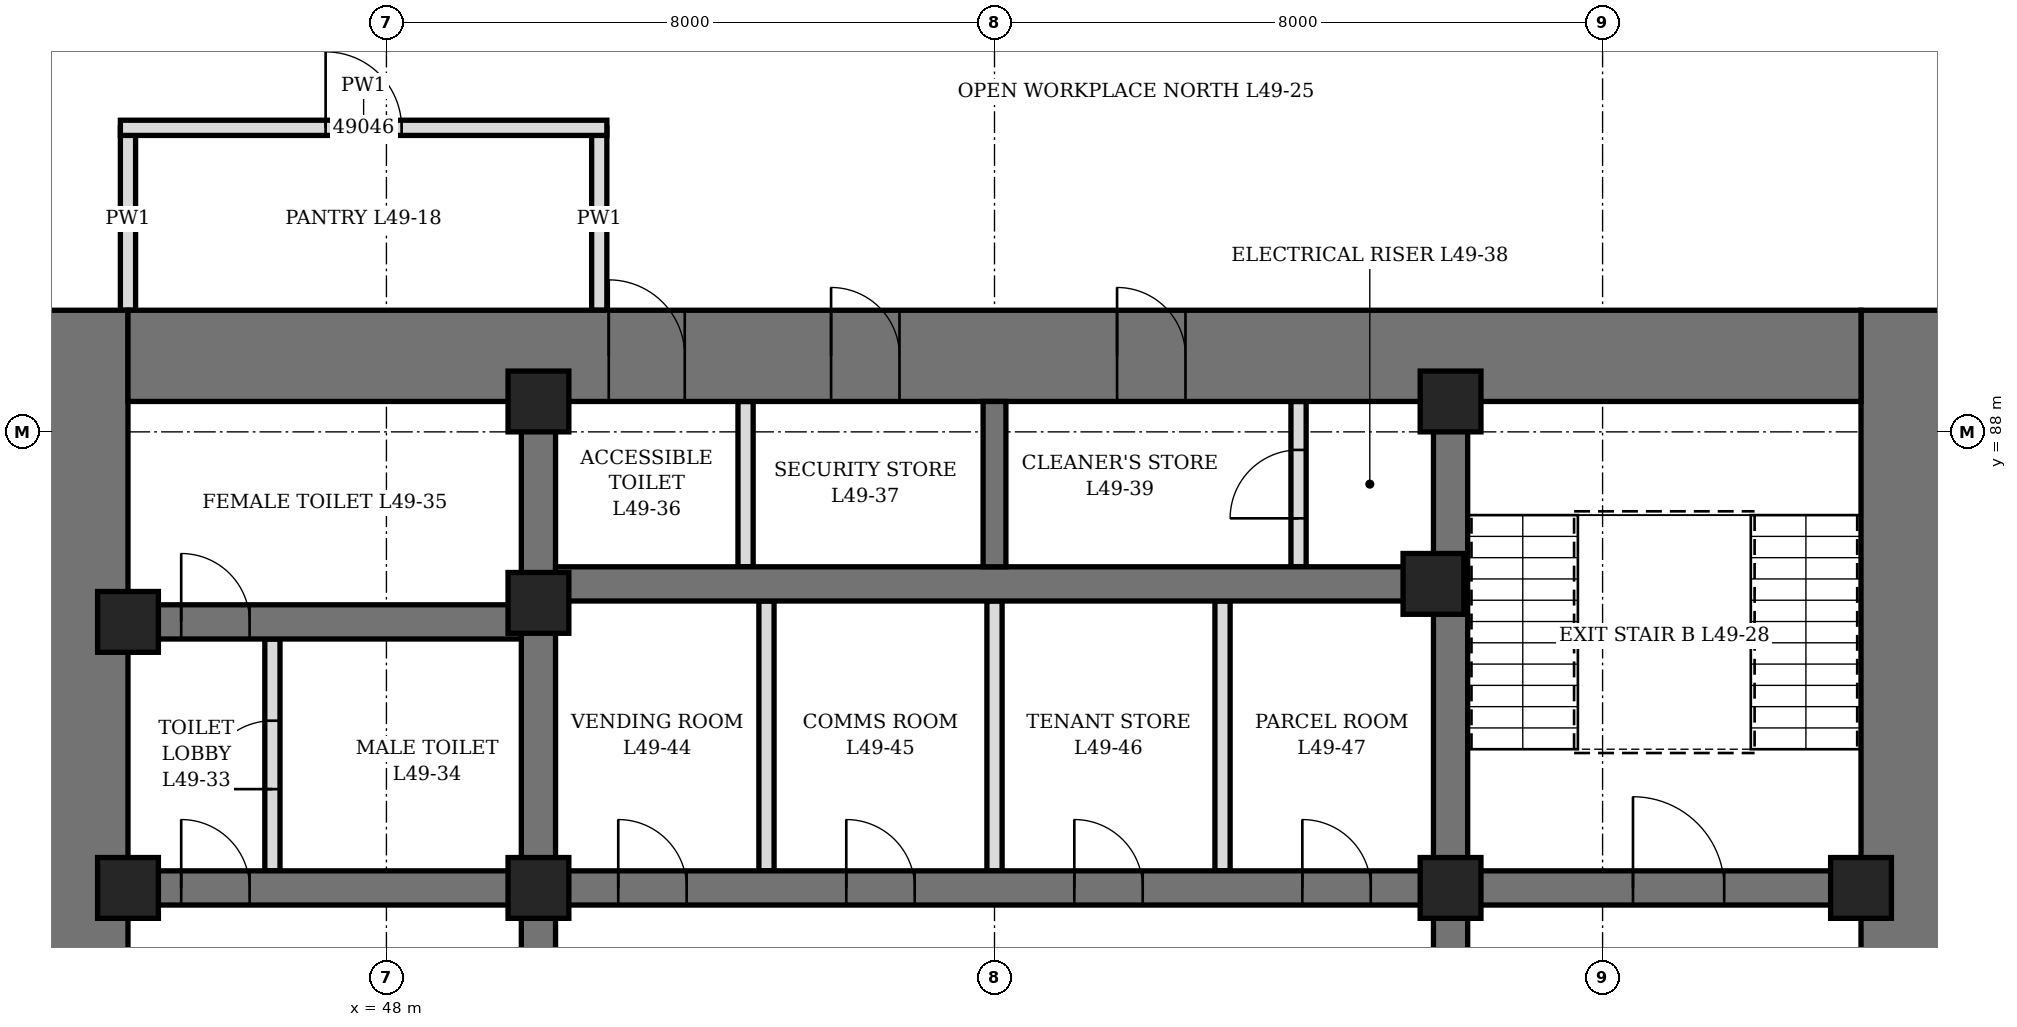
"""IFC4 building model, lengths in metres.
Left out: names, types, materials, properties, quantities, classifications, styles, units other than length and angle.
Written with IfcOpenShell. Run it as: python <this file> out.ifc"""

import sys

from ifc_helpers import new_model, si_unit, direction, frame, frame_2d, origin, origin_2d, place, context, subcontext, project, spatial, rectangle, hollow_rectangle, extrude, element, fill, save


model = new_model("IFC4")
c1 = context("Model", 3, precision=1e-05, world=origin(), true_north=direction((0.0, 1.0)))
c2 = subcontext(c1, "Body", "Model", "MODEL_VIEW")
j1 = project(units=[si_unit("LENGTHUNIT", "METRE"), si_unit("PLANEANGLEUNIT", "RADIAN")], contexts=[c1])
p1 = place(None, origin())
s1 = spatial("IfcSite", under=j1, at=p1, CompositionType="ELEMENT")
p2 = place(p1, origin())
s2 = spatial("IfcBuilding", under=s1, at=p2, CompositionType="ELEMENT")
p3 = place(p2, frame((0.0, 0.0, 219.1)))
s3 = spatial("IfcBuildingStorey", under=s2, at=p3, CompositionType="ELEMENT", Elevation=219.1)
p4 = place(p3, frame((44.0, 70.4, 0.0), z_axis=(0.0, 0.0, 1.0), x_axis=(0.0, 1.0, 0.0)))
e1 = element("IfcWall", 1, at=p4, inside=s3, PredefinedType="SHEAR", context=c2, shape_type="SweptSolid", body=[
    extrude(rectangle(XDim=19.2, YDim=1.2, at=frame_2d((9.6, 0.0))), origin(), (0.0, 0.0, 1.0), 4.2),
])
p5 = place(p4, frame((8.6, 0.0, 0.0)))
e2 = element("IfcOpeningElement", 2, at=p5, cuts=e1, PredefinedType="OPENING", context=c2, shape_type="SweptSolid", body=[
    extrude(rectangle(XDim=2.0, YDim=2.4, at=frame_2d((1.0, 1.2))), frame((0.0, 0.61, 0.0), z_axis=(0.0, -1.0, 0.0), x_axis=(1.0, 0.0, 0.0)), (0.0, 0.0, 1.0), 1.22),
])
p6 = place(p3, frame((68.0, 70.4, 0.0), z_axis=(0.0, 0.0, 1.0), x_axis=(0.0, 1.0, 0.0)))
e3 = element("IfcWall", 3, at=p6, inside=s3, PredefinedType="SHEAR", context=c2, shape_type="SweptSolid", body=[
    extrude(rectangle(XDim=19.2, YDim=1.2, at=frame_2d((9.6, 0.0))), origin(), (0.0, 0.0, 1.0), 4.2),
])
p7 = place(p6, frame((8.6, 0.0, 0.0)))
e4 = element("IfcOpeningElement", 4, at=p7, cuts=e3, PredefinedType="OPENING", context=c2, shape_type="SweptSolid", body=[
    extrude(rectangle(XDim=2.0, YDim=2.4, at=frame_2d((1.0, 1.2))), frame((0.0, 0.61, 0.0), z_axis=(0.0, -1.0, 0.0), x_axis=(1.0, 0.0, 0.0)), (0.0, 0.0, 1.0), 1.22),
])
p8 = place(p3, frame((44.6, 89.0, 0.0), z_axis=(0.0, 0.0, 1.0), x_axis=(1.0, 0.0, 0.0)))
e5 = element("IfcWall", 5, at=p8, inside=s3, PredefinedType="SHEAR", context=c2, shape_type="SweptSolid", body=[
    extrude(rectangle(XDim=22.8, YDim=1.2, at=frame_2d((11.4, 0.0))), origin(), (0.0, 0.0, 1.0), 4.2),
])
p9 = place(p8, frame((6.325, 0.0, 0.0)))
e6 = element("IfcOpeningElement", 6, at=p9, cuts=e5, PredefinedType="OPENING", context=c2, shape_type="SweptSolid", body=[
    extrude(rectangle(XDim=1.0, YDim=2.1, at=frame_2d((0.5, 1.05))), frame((0.0, 0.61, 0.0), z_axis=(0.0, -1.0, 0.0), x_axis=(1.0, 0.0, 0.0)), (0.0, 0.0, 1.0), 1.22),
])
p10 = place(p8, frame((9.25, 0.0, 0.0)))
e7 = element("IfcOpeningElement", 7, at=p10, cuts=e5, PredefinedType="OPENING", context=c2, shape_type="SweptSolid", body=[
    extrude(rectangle(XDim=0.9, YDim=2.1, at=frame_2d((0.45, 1.05))), frame((0.0, 0.61, 0.0), z_axis=(0.0, -1.0, 0.0), x_axis=(1.0, 0.0, 0.0)), (0.0, 0.0, 1.0), 1.22),
])
p11 = place(p8, frame((13.012, 0.0, 0.0)))
e8 = element("IfcOpeningElement", 8, at=p11, cuts=e5, PredefinedType="OPENING", context=c2, shape_type="SweptSolid", body=[
    extrude(rectangle(XDim=0.9, YDim=2.1, at=frame_2d((0.45, 1.05))), frame((0.0, 0.61, 0.0), z_axis=(0.0, -1.0, 0.0), x_axis=(1.0, 0.0, 0.0)), (0.0, 0.0, 1.0), 1.22),
])
p12 = place(p3, frame((50.0, 71.6, 0.0), z_axis=(0.0, 0.0, 1.0), x_axis=(0.0, 1.0, 0.0)))
e9 = element("IfcWall", 9, at=p12, inside=s3, PredefinedType="SHEAR", context=c2, shape_type="SweptSolid", body=[
    extrude(rectangle(XDim=16.8, YDim=0.45, at=frame_2d((8.4, 0.0))), origin(), (0.0, 0.0, 1.0), 4.2),
])
p13 = place(p12, frame((7.5, 0.0, 0.0)))
e10 = element("IfcOpeningElement", 10, at=p13, cuts=e9, PredefinedType="OPENING", context=c2, shape_type="SweptSolid", body=[
    extrude(rectangle(XDim=1.8, YDim=2.4, at=frame_2d((0.9, 1.2))), frame((0.0, 0.235, 0.0), z_axis=(0.0, -1.0, 0.0), x_axis=(1.0, 0.0, 0.0)), (0.0, 0.0, 1.0), 0.47),
])
p14 = place(p3, frame((62.0, 71.6, 0.0), z_axis=(0.0, 0.0, 1.0), x_axis=(0.0, 1.0, 0.0)))
e11 = element("IfcWall", 11, at=p14, inside=s3, PredefinedType="SHEAR", context=c2, shape_type="SweptSolid", body=[
    extrude(rectangle(XDim=16.8, YDim=0.45, at=frame_2d((8.4, 0.0))), origin(), (0.0, 0.0, 1.0), 4.2),
])
p15 = place(p14, frame((7.5, 0.0, 0.0)))
e12 = element("IfcOpeningElement", 12, at=p15, cuts=e11, PredefinedType="OPENING", context=c2, shape_type="SweptSolid", body=[
    extrude(rectangle(XDim=1.8, YDim=2.4, at=frame_2d((0.9, 1.2))), frame((0.0, 0.235, 0.0), z_axis=(0.0, -1.0, 0.0), x_axis=(1.0, 0.0, 0.0)), (0.0, 0.0, 1.0), 0.47),
])
p16 = place(p3, frame((44.6, 82.0, 0.0), z_axis=(0.0, 0.0, 1.0), x_axis=(1.0, 0.0, 0.0)))
e13 = element("IfcWall", 13, at=p16, inside=s3, PredefinedType="SHEAR", context=c2, shape_type="SweptSolid", body=[
    extrude(rectangle(XDim=5.175, YDim=0.45, at=frame_2d((2.587, 0.0))), origin(), (0.0, 0.0, 1.0), 4.2),
])
p17 = place(p16, frame((0.7, 0.0, 0.0)))
e14 = element("IfcOpeningElement", 14, at=p17, cuts=e13, PredefinedType="OPENING", context=c2, shape_type="SweptSolid", body=[
    extrude(rectangle(XDim=0.9, YDim=2.1, at=frame_2d((0.45, 1.05))), frame((0.0, 0.235, 0.0), z_axis=(0.0, -1.0, 0.0), x_axis=(1.0, 0.0, 0.0)), (0.0, 0.0, 1.0), 0.47),
])
p18 = place(p3, frame((44.6, 85.5, 0.0), z_axis=(0.0, 0.0, 1.0), x_axis=(1.0, 0.0, 0.0)))
e15 = element("IfcWall", 15, at=p18, inside=s3, PredefinedType="SHEAR", context=c2, shape_type="SweptSolid", body=[
    extrude(rectangle(XDim=5.175, YDim=0.45, at=frame_2d((2.587, 0.0))), origin(), (0.0, 0.0, 1.0), 4.2),
])
p19 = place(p18, frame((0.7, 0.0, 0.0)))
e16 = element("IfcOpeningElement", 16, at=p19, cuts=e15, PredefinedType="OPENING", context=c2, shape_type="SweptSolid", body=[
    extrude(rectangle(XDim=0.9, YDim=2.1, at=frame_2d((0.45, 1.05))), frame((0.0, 0.235, 0.0), z_axis=(0.0, -1.0, 0.0), x_axis=(1.0, 0.0, 0.0)), (0.0, 0.0, 1.0), 0.47),
])
p20 = place(p3, frame((62.225, 82.0, 0.0), z_axis=(0.0, 0.0, 1.0), x_axis=(1.0, 0.0, 0.0)))
e17 = element("IfcWall", 17, at=p20, inside=s3, PredefinedType="SHEAR", context=c2, shape_type="SweptSolid", body=[
    extrude(rectangle(XDim=5.175, YDim=0.45, at=frame_2d((2.587, 0.0))), origin(), (0.0, 0.0, 1.0), 4.2),
])
p21 = place(p20, frame((2.175, 0.0, 0.0)))
e18 = element("IfcOpeningElement", 18, at=p21, cuts=e17, PredefinedType="OPENING", context=c2, shape_type="SweptSolid", body=[
    extrude(rectangle(XDim=1.2, YDim=2.1, at=frame_2d((0.6, 1.05))), frame((0.0, 0.235, 0.0), z_axis=(0.0, -1.0, 0.0), x_axis=(1.0, 0.0, 0.0)), (0.0, 0.0, 1.0), 0.47),
])
p22 = place(p3, frame((50.225, 82.0, 0.0), z_axis=(0.0, 0.0, 1.0), x_axis=(1.0, 0.0, 0.0)))
e19 = element("IfcWall", 19, at=p22, inside=s3, PredefinedType="SHEAR", context=c2, shape_type="SweptSolid", body=[
    extrude(rectangle(XDim=11.55, YDim=0.45, at=frame_2d((5.775, 0.0))), origin(), (0.0, 0.0, 1.0), 4.2),
])
p23 = place(p22, frame((0.825, 0.0, 0.0)))
e20 = element("IfcOpeningElement", 20, at=p23, cuts=e19, PredefinedType="OPENING", context=c2, shape_type="SweptSolid", body=[
    extrude(rectangle(XDim=0.9, YDim=2.1, at=frame_2d((0.45, 1.05))), frame((0.0, 0.235, 0.0), z_axis=(0.0, -1.0, 0.0), x_axis=(1.0, 0.0, 0.0)), (0.0, 0.0, 1.0), 0.47),
])
p24 = place(p22, frame((3.825, 0.0, 0.0)))
e21 = element("IfcOpeningElement", 21, at=p24, cuts=e19, PredefinedType="OPENING", context=c2, shape_type="SweptSolid", body=[
    extrude(rectangle(XDim=0.9, YDim=2.1, at=frame_2d((0.45, 1.05))), frame((0.0, 0.235, 0.0), z_axis=(0.0, -1.0, 0.0), x_axis=(1.0, 0.0, 0.0)), (0.0, 0.0, 1.0), 0.47),
])
p25 = place(p22, frame((6.825, 0.0, 0.0)))
e22 = element("IfcOpeningElement", 22, at=p25, cuts=e19, PredefinedType="OPENING", context=c2, shape_type="SweptSolid", body=[
    extrude(rectangle(XDim=0.9, YDim=2.1, at=frame_2d((0.45, 1.05))), frame((0.0, 0.235, 0.0), z_axis=(0.0, -1.0, 0.0), x_axis=(1.0, 0.0, 0.0)), (0.0, 0.0, 1.0), 0.47),
])
p26 = place(p22, frame((9.825, 0.0, 0.0)))
e23 = element("IfcOpeningElement", 23, at=p26, cuts=e19, PredefinedType="OPENING", context=c2, shape_type="SweptSolid", body=[
    extrude(rectangle(XDim=0.9, YDim=2.1, at=frame_2d((0.45, 1.05))), frame((0.0, 0.235, 0.0), z_axis=(0.0, -1.0, 0.0), x_axis=(1.0, 0.0, 0.0)), (0.0, 0.0, 1.0), 0.47),
])
p27 = place(p3, frame((50.225, 86.0, 0.0), z_axis=(0.0, 0.0, 1.0), x_axis=(1.0, 0.0, 0.0)))
e24 = element("IfcWall", 24, at=p27, inside=s3, PredefinedType="SHEAR", context=c2, shape_type="SweptSolid", body=[
    extrude(rectangle(XDim=11.55, YDim=0.45, at=frame_2d((5.775, 0.0))), origin(), (0.0, 0.0, 1.0), 4.2),
])
p28 = place(p3, frame((56.0, 86.225, 0.0), z_axis=(0.0, 0.0, 1.0), x_axis=(0.0, 1.0, 0.0)))
e25 = element("IfcWall", 25, at=p28, inside=s3, PredefinedType="SHEAR", context=c2, shape_type="SweptSolid", body=[
    extrude(rectangle(XDim=2.175, YDim=0.3, at=frame_2d((1.087, 0.0))), origin(), (0.0, 0.0, 1.0), 4.2),
])
for number, where, z_axis, x_axis in (
    (26, (44.6, 82.0, 0.0), (0.0, 0.0, 1.0), (1.0, 0.0, 0.0)),
    (27, (44.6, 85.5, 0.0), (0.0, 0.0, 1.0), (1.0, 0.0, 0.0)),
    (28, (50.0, 82.0, 0.0), (0.0, 0.0, 1.0), (1.0, 0.0, 0.0)),
    (29, (50.0, 85.75, 0.0), (0.0, 0.0, 1.0), (1.0, 0.0, 0.0)),
    (30, (50.0, 88.4, 0.0), (0.0, 0.0, 1.0), (1.0, 0.0, 0.0)),
    (31, (61.775, 86.0, 0.0), (0.0, 0.0, 1.0), (1.0, 0.0, 0.0)),
    (32, (62.0, 82.0, 0.0), (0.0, 0.0, 1.0), (1.0, 0.0, 0.0)),
    (33, (62.0, 88.4, 0.0), (0.0, 0.0, 1.0), (1.0, 0.0, 0.0)),
    (34, (67.4, 82.0, 0.0), (0.0, 0.0, 1.0), (1.0, 0.0, 0.0)),
):
    element("IfcColumn", number, at=place(p3, frame(where, z_axis=z_axis, x_axis=x_axis)), inside=s3, PredefinedType="COLUMN", context=c2, shape_type="SweptSolid", body=[
        extrude(hollow_rectangle(XDim=0.8, YDim=0.8, WallThickness=0.1, at=origin_2d()), origin(), (0.0, 0.0, 1.0), 4.2),
    ])
p29 = place(p3, frame((46.5, 82.225, 0.0), z_axis=(0.0, 0.0, 1.0), x_axis=(0.0, 1.0, 0.0)))
e35 = element("IfcWall", 35, at=p29, inside=s3, PredefinedType="PARTITIONING", context=c2, shape_type="SweptSolid", body=[
    extrude(rectangle(XDim=3.05, YDim=0.2, at=frame_2d((1.525, 0.0))), origin(), (0.0, 0.0, 1.0), 4.04),
])
p30 = place(p29, frame((1.075, 0.0, 0.0)))
e36 = element("IfcOpeningElement", 36, at=p30, cuts=e35, PredefinedType="OPENING", context=c2, shape_type="SweptSolid", body=[
    extrude(rectangle(XDim=0.9, YDim=2.1, at=frame_2d((0.45, 1.05))), frame((0.0, 0.11, 0.0), z_axis=(0.0, -1.0, 0.0), x_axis=(1.0, 0.0, 0.0)), (0.0, 0.0, 1.0), 0.22),
])
p31 = place(p3, frame((52.725, 86.225, 0.0), z_axis=(0.0, 0.0, 1.0), x_axis=(0.0, 1.0, 0.0)))
e37 = element("IfcWall", 37, at=p31, inside=s3, PredefinedType="PARTITIONING", context=c2, shape_type="SweptSolid", body=[
    extrude(rectangle(XDim=2.175, YDim=0.2, at=frame_2d((1.087, 0.0))), origin(), (0.0, 0.0, 1.0), 4.04),
])
p32 = place(p3, frame((60.0, 86.225, 0.0), z_axis=(0.0, 0.0, 1.0), x_axis=(0.0, 1.0, 0.0)))
e38 = element("IfcWall", 38, at=p32, inside=s3, PredefinedType="PARTITIONING", context=c2, shape_type="SweptSolid", body=[
    extrude(rectangle(XDim=2.175, YDim=0.2, at=frame_2d((1.087, 0.0))), origin(), (0.0, 0.0, 1.0), 4.04),
])
p33 = place(p32, frame((0.637, 0.0, 0.0)))
e39 = element("IfcOpeningElement", 39, at=p33, cuts=e38, PredefinedType="OPENING", context=c2, shape_type="SweptSolid", body=[
    extrude(rectangle(XDim=0.9, YDim=2.1, at=frame_2d((0.45, 1.05))), frame((0.0, 0.11, 0.0), z_axis=(0.0, -1.0, 0.0), x_axis=(1.0, 0.0, 0.0)), (0.0, 0.0, 1.0), 0.22),
])
p34 = place(p3, frame((53.0, 82.225, 0.0), z_axis=(0.0, 0.0, 1.0), x_axis=(0.0, 1.0, 0.0)))
e40 = element("IfcWall", 40, at=p34, inside=s3, PredefinedType="PARTITIONING", context=c2, shape_type="SweptSolid", body=[
    extrude(rectangle(XDim=3.55, YDim=0.2, at=frame_2d((1.775, 0.0))), origin(), (0.0, 0.0, 1.0), 4.04),
])
p35 = place(p3, frame((56.0, 82.225, 0.0), z_axis=(0.0, 0.0, 1.0), x_axis=(0.0, 1.0, 0.0)))
e41 = element("IfcWall", 41, at=p35, inside=s3, PredefinedType="PARTITIONING", context=c2, shape_type="SweptSolid", body=[
    extrude(rectangle(XDim=3.55, YDim=0.2, at=frame_2d((1.775, 0.0))), origin(), (0.0, 0.0, 1.0), 3.14),
])
p36 = place(p3, frame((59.0, 82.225, 0.0), z_axis=(0.0, 0.0, 1.0), x_axis=(0.0, 1.0, 0.0)))
e42 = element("IfcWall", 42, at=p36, inside=s3, PredefinedType="PARTITIONING", context=c2, shape_type="SweptSolid", body=[
    extrude(rectangle(XDim=3.55, YDim=0.2, at=frame_2d((1.775, 0.0))), origin(), (0.0, 0.0, 1.0), 4.04),
])
for number, where, z_axis, x_axis in (
    (43, (44.6, 89.6, 0.0), (0.0, 0.0, 1.0), (0.0, 1.0, 0.0)),
    (44, (50.8, 89.6, 0.0), (0.0, 0.0, 1.0), (0.0, 1.0, 0.0)),
):
    element("IfcWall", number, at=place(p3, frame(where, z_axis=z_axis, x_axis=x_axis)), inside=s3, PredefinedType="PARTITIONING", context=c2, shape_type="SweptSolid", body=[
        extrude(rectangle(XDim=2.4, YDim=0.2, at=frame_2d((1.2, 0.0))), origin(), (0.0, 0.0, 1.0), 4.04),
    ])
p37 = place(p3, frame((44.5, 92.0, 0.0), z_axis=(0.0, 0.0, 1.0), x_axis=(1.0, 0.0, 0.0)))
e45 = element("IfcWall", 45, at=p37, inside=s3, PredefinedType="PARTITIONING", context=c2, shape_type="SweptSolid", body=[
    extrude(rectangle(XDim=6.4, YDim=0.2, at=frame_2d((3.2, 0.0))), origin(), (0.0, 0.0, 1.0), 4.04),
])
p38 = place(p37, frame((2.7, 0.0, 0.0)))
e46 = element("IfcOpeningElement", 46, at=p38, cuts=e45, PredefinedType="OPENING", context=c2, shape_type="SweptSolid", body=[
    extrude(rectangle(XDim=1.0, YDim=2.1, at=frame_2d((0.5, 1.05))), frame((0.0, 0.11, 0.0), z_axis=(0.0, -1.0, 0.0), x_axis=(1.0, 0.0, 0.0)), (0.0, 0.0, 1.0), 0.22),
])
p39 = place(p17, origin())
e47 = element("IfcDoor", 47, at=p39, inside=s3, OperationType="SINGLE_SWING_LEFT", PredefinedType="DOOR", context=c2, shape_type="SweptSolid", body=[
    extrude(rectangle(XDim=0.9, YDim=2.1, at=frame_2d((0.45, 1.05))), frame((0.0, 0.225, 0.0), z_axis=(0.0, -1.0, 0.0), x_axis=(1.0, 0.0, 0.0)), (0.0, 0.0, 1.0), 0.449),
])
fill(e14, e47)
p40 = place(p30, origin())
e48 = element("IfcDoor", 48, at=p40, inside=s3, OperationType="SINGLE_SWING_RIGHT", PredefinedType="DOOR", context=c2, shape_type="SweptSolid", body=[
    extrude(rectangle(XDim=0.9, YDim=2.1, at=frame_2d((0.45, 1.05))), frame((0.0, 0.1, 0.0), z_axis=(0.0, -1.0, 0.0), x_axis=(1.0, 0.0, 0.0)), (0.0, 0.0, 1.0), 0.199),
])
fill(e36, e48)
p41 = place(p19, origin())
e49 = element("IfcDoor", 49, at=p41, inside=s3, OperationType="SINGLE_SWING_RIGHT", PredefinedType="DOOR", context=c2, shape_type="SweptSolid", body=[
    extrude(rectangle(XDim=0.9, YDim=2.1, at=frame_2d((0.45, 1.05))), frame((0.0, 0.225, 0.0), z_axis=(0.0, -1.0, 0.0), x_axis=(1.0, 0.0, 0.0)), (0.0, 0.0, 1.0), 0.449),
])
fill(e16, e49)
p42 = place(p9, origin())
e50 = element("IfcDoor", 50, at=p42, inside=s3, OperationType="SINGLE_SWING_LEFT", PredefinedType="DOOR", context=c2, shape_type="SweptSolid", body=[
    extrude(rectangle(XDim=1.0, YDim=2.1, at=frame_2d((0.5, 1.05))), frame((0.0, 0.35, 0.0), z_axis=(0.0, -1.0, 0.0), x_axis=(1.0, 0.0, 0.0)), (0.0, 0.0, 1.0), 0.7),
])
fill(e6, e50)
p43 = place(p10, origin())
e51 = element("IfcDoor", 51, at=p43, inside=s3, OperationType="SINGLE_SWING_LEFT", PredefinedType="DOOR", context=c2, shape_type="SweptSolid", body=[
    extrude(rectangle(XDim=0.9, YDim=2.1, at=frame_2d((0.45, 1.05))), frame((0.0, 0.35, 0.0), z_axis=(0.0, -1.0, 0.0), x_axis=(1.0, 0.0, 0.0)), (0.0, 0.0, 1.0), 0.7),
])
fill(e7, e51)
p44 = place(p11, origin())
e52 = element("IfcDoor", 52, at=p44, inside=s3, OperationType="SINGLE_SWING_LEFT", PredefinedType="DOOR", context=c2, shape_type="SweptSolid", body=[
    extrude(rectangle(XDim=0.9, YDim=2.1, at=frame_2d((0.45, 1.05))), frame((0.0, 0.35, 0.0), z_axis=(0.0, -1.0, 0.0), x_axis=(1.0, 0.0, 0.0)), (0.0, 0.0, 1.0), 0.7),
])
fill(e8, e52)
p45 = place(p33, origin())
e53 = element("IfcDoor", 53, at=p45, inside=s3, OperationType="SINGLE_SWING_LEFT", PredefinedType="DOOR", context=c2, shape_type="SweptSolid", body=[
    extrude(rectangle(XDim=0.9, YDim=2.1, at=frame_2d((0.45, 1.05))), frame((0.0, 0.1, 0.0), z_axis=(0.0, -1.0, 0.0), x_axis=(1.0, 0.0, 0.0)), (0.0, 0.0, 1.0), 0.199),
])
fill(e39, e53)
p46 = place(p23, origin())
e54 = element("IfcDoor", 54, at=p46, inside=s3, OperationType="SINGLE_SWING_LEFT", PredefinedType="DOOR", context=c2, shape_type="SweptSolid", body=[
    extrude(rectangle(XDim=0.9, YDim=2.1, at=frame_2d((0.45, 1.05))), frame((0.0, 0.225, 0.0), z_axis=(0.0, -1.0, 0.0), x_axis=(1.0, 0.0, 0.0)), (0.0, 0.0, 1.0), 0.449),
])
fill(e20, e54)
p47 = place(p24, origin())
e55 = element("IfcDoor", 55, at=p47, inside=s3, OperationType="SINGLE_SWING_LEFT", PredefinedType="DOOR", context=c2, shape_type="SweptSolid", body=[
    extrude(rectangle(XDim=0.9, YDim=2.1, at=frame_2d((0.45, 1.05))), frame((0.0, 0.225, 0.0), z_axis=(0.0, -1.0, 0.0), x_axis=(1.0, 0.0, 0.0)), (0.0, 0.0, 1.0), 0.449),
])
fill(e21, e55)
p48 = place(p25, origin())
e56 = element("IfcDoor", 56, at=p48, inside=s3, OperationType="SINGLE_SWING_LEFT", PredefinedType="DOOR", context=c2, shape_type="SweptSolid", body=[
    extrude(rectangle(XDim=0.9, YDim=2.1, at=frame_2d((0.45, 1.05))), frame((0.0, 0.225, 0.0), z_axis=(0.0, -1.0, 0.0), x_axis=(1.0, 0.0, 0.0)), (0.0, 0.0, 1.0), 0.449),
])
fill(e22, e56)
p49 = place(p26, origin())
e57 = element("IfcDoor", 57, at=p49, inside=s3, OperationType="SINGLE_SWING_LEFT", PredefinedType="DOOR", context=c2, shape_type="SweptSolid", body=[
    extrude(rectangle(XDim=0.9, YDim=2.1, at=frame_2d((0.45, 1.05))), frame((0.0, 0.225, 0.0), z_axis=(0.0, -1.0, 0.0), x_axis=(1.0, 0.0, 0.0)), (0.0, 0.0, 1.0), 0.449),
])
fill(e23, e57)
p50 = place(p21, origin())
e58 = element("IfcDoor", 58, at=p50, inside=s3, OperationType="SINGLE_SWING_LEFT", PredefinedType="DOOR", context=c2, shape_type="SweptSolid", body=[
    extrude(rectangle(XDim=1.2, YDim=2.1, at=frame_2d((0.6, 1.05))), frame((0.0, 0.225, 0.0), z_axis=(0.0, -1.0, 0.0), x_axis=(1.0, 0.0, 0.0)), (0.0, 0.0, 1.0), 0.449),
])
fill(e18, e58)
p51 = place(p38, origin())
e59 = element("IfcDoor", 59, at=p51, inside=s3, OperationType="SINGLE_SWING_LEFT", PredefinedType="DOOR", context=c2, shape_type="SweptSolid", body=[
    extrude(rectangle(XDim=1.0, YDim=2.1, at=frame_2d((0.5, 1.05))), frame((0.0, 0.1, 0.0), z_axis=(0.0, -1.0, 0.0), x_axis=(1.0, 0.0, 0.0)), (0.0, 0.0, 1.0), 0.199),
])
fill(e46, e59)
save(model, sys.argv[1])
